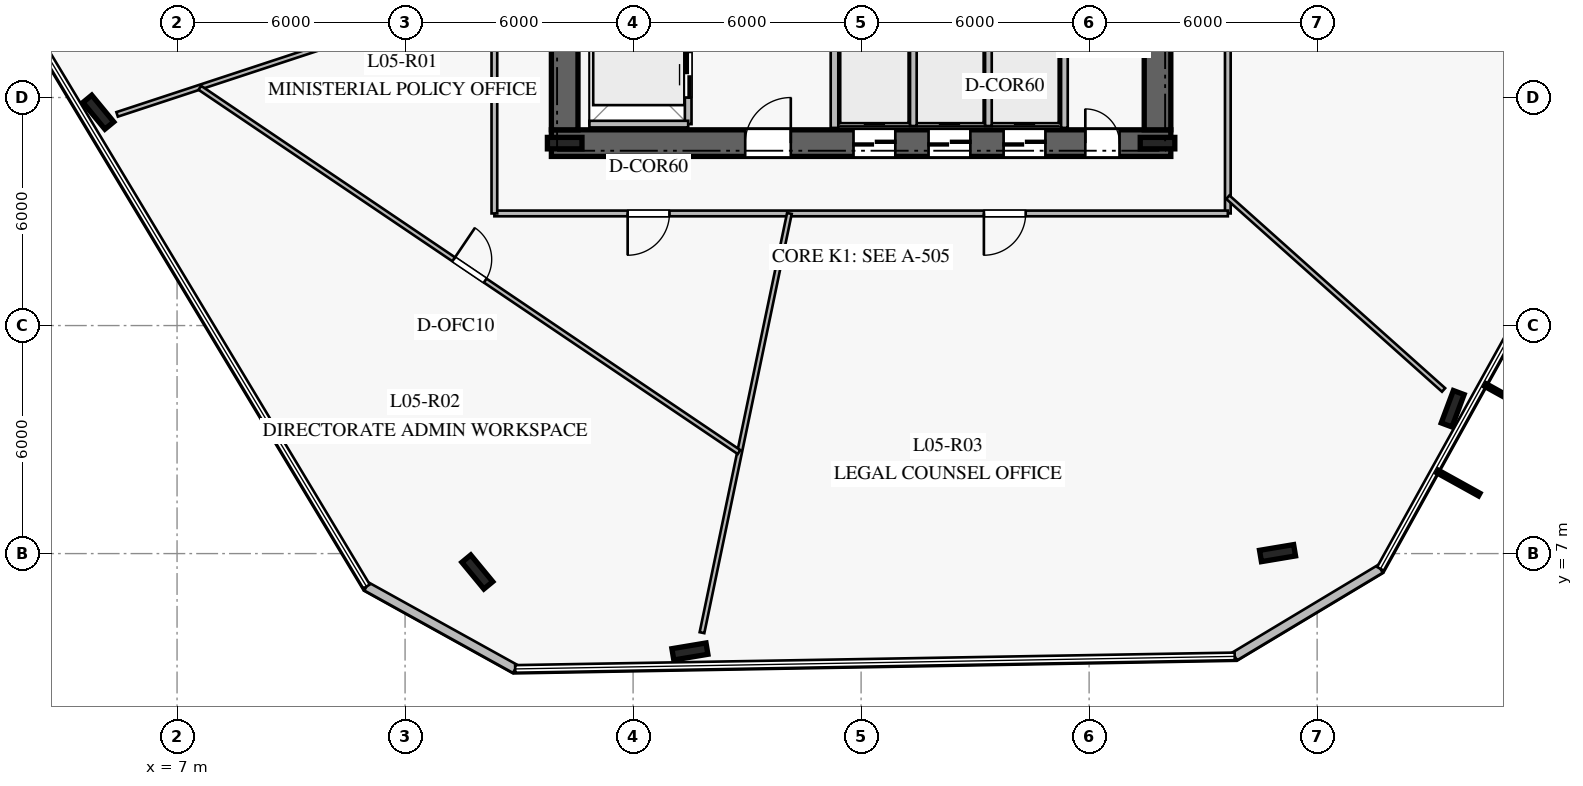
"""IFC4 building model, lengths in metres.
Left out: names, types, materials, properties, quantities, classifications, styles, units other than length and angle.
Written with IfcOpenShell. Run it as: python <this file> out.ifc"""

import sys

from ifc_helpers import new_model, si_unit, direction, frame, frame_2d, origin, origin_2d, place, context, subcontext, project, spatial, rectangle, i_section, extrude, element, fill, save


model = new_model("IFC4")
c1 = context("Model", 3, precision=1e-05, world=origin(), true_north=direction((0.0, 1.0)))
c2 = subcontext(c1, "Body", "Model", "MODEL_VIEW")
j1 = project(units=[si_unit("LENGTHUNIT", "METRE"), si_unit("PLANEANGLEUNIT", "RADIAN")], contexts=[c1])
p1 = place(None, origin())
s1 = spatial("IfcSite", under=j1, at=p1, CompositionType="ELEMENT")
p2 = place(p1, origin())
s2 = spatial("IfcBuilding", under=s1, at=p2, CompositionType="ELEMENT")
p3 = place(p2, frame((0.0, 0.0, 24.0)))
s3 = spatial("IfcBuildingStorey", under=s2, at=p3, CompositionType="ELEMENT", Elevation=24.0)
p4 = place(p3, frame((16.85, 17.8, 0.0), z_axis=(0.0, 0.0, 1.0), x_axis=(1.0, 0.0, 0.0)))
e1 = element("IfcWall", 1, at=p4, inside=s3, PredefinedType="SHEAR", context=c2, shape_type="SweptSolid", body=[
    extrude(rectangle(XDim=16.3, YDim=0.7, at=frame_2d((8.15, 0.0))), origin(), (0.0, 0.0, 1.0), 3.76),
])
p5 = place(p4, frame((5.1, 0.0, 0.0)))
e2 = element("IfcOpeningElement", 2, at=p5, cuts=e1, PredefinedType="OPENING", context=c2, shape_type="SweptSolid", body=[
    extrude(rectangle(XDim=1.2, YDim=2.25, at=frame_2d((0.6, 1.125))), frame((0.0, 0.36, 0.0), z_axis=(0.0, -1.0, 0.0), x_axis=(1.0, 0.0, 0.0)), (0.0, 0.0, 1.0), 0.72),
])
p6 = place(p4, frame((14.05, 0.0, 0.0)))
e3 = element("IfcOpeningElement", 3, at=p6, cuts=e1, PredefinedType="OPENING", context=c2, shape_type="SweptSolid", body=[
    extrude(rectangle(XDim=0.9, YDim=2.1, at=frame_2d((0.45, 1.05))), frame((0.0, 0.36, 0.0), z_axis=(0.0, -1.0, 0.0), x_axis=(1.0, 0.0, 0.0)), (0.0, 0.0, 1.0), 0.72),
])
p7 = place(p4, frame((7.95, 0.0, 0.0)))
e4 = element("IfcOpeningElement", 4, at=p7, cuts=e1, PredefinedType="OPENING", context=c2, shape_type="SweptSolid", body=[
    extrude(rectangle(XDim=1.1, YDim=2.2, at=frame_2d((0.55, 1.1))), frame((0.0, 0.36, 0.0), z_axis=(0.0, -1.0, 0.0), x_axis=(1.0, 0.0, 0.0)), (0.0, 0.0, 1.0), 0.72),
])
p8 = place(p4, frame((9.925, 0.0, 0.0)))
e5 = element("IfcOpeningElement", 5, at=p8, cuts=e1, PredefinedType="OPENING", context=c2, shape_type="SweptSolid", body=[
    extrude(rectangle(XDim=1.1, YDim=2.2, at=frame_2d((0.55, 1.1))), frame((0.0, 0.36, 0.0), z_axis=(0.0, -1.0, 0.0), x_axis=(1.0, 0.0, 0.0)), (0.0, 0.0, 1.0), 0.72),
])
p9 = place(p4, frame((11.9, 0.0, 0.0)))
e6 = element("IfcOpeningElement", 6, at=p9, cuts=e1, PredefinedType="OPENING", context=c2, shape_type="SweptSolid", body=[
    extrude(rectangle(XDim=1.1, YDim=2.2, at=frame_2d((0.55, 1.1))), frame((0.0, 0.36, 0.0), z_axis=(0.0, -1.0, 0.0), x_axis=(1.0, 0.0, 0.0)), (0.0, 0.0, 1.0), 0.72),
])
p10 = place(p3, frame((17.2, 31.85, 0.0), z_axis=(0.0, 0.0, 1.0), x_axis=(0.0, -1.0, 0.0)))
e7 = element("IfcWall", 7, at=p10, inside=s3, PredefinedType="SHEAR", context=c2, shape_type="SweptSolid", body=[
    extrude(rectangle(XDim=13.7, YDim=0.7, at=frame_2d((6.85, 0.0))), origin(), (0.0, 0.0, 1.0), 3.76),
])
p11 = place(p10, frame((2.0, 0.0, 0.0)))
e8 = element("IfcOpeningElement", 8, at=p11, cuts=e7, PredefinedType="OPENING", context=c2, shape_type="SweptSolid", body=[
    extrude(rectangle(XDim=1.5, YDim=2.2, at=frame_2d((0.75, 1.1))), frame((0.0, 0.36, 0.0), z_axis=(0.0, -1.0, 0.0), x_axis=(1.0, 0.0, 0.0)), (0.0, 0.0, 1.0), 0.72),
])
p12 = place(p3, frame((32.8, 18.15, 0.0), z_axis=(0.0, 0.0, 1.0), x_axis=(0.0, 1.0, 0.0)))
e9 = element("IfcWall", 9, at=p12, inside=s3, PredefinedType="SHEAR", context=c2, shape_type="SweptSolid", body=[
    extrude(rectangle(XDim=13.7, YDim=0.7, at=frame_2d((6.85, 0.0))), origin(), (0.0, 0.0, 1.0), 3.76),
])
for number, where, z_axis, x_axis in (
    (10, (17.2, 17.8, 0.0), (0.0, 0.0, 1.0), (1.0, 0.0, 0.0)),
    (11, (32.8, 17.8, 0.0), (0.0, 0.0, 1.0), (1.0, 0.0, 0.0)),
):
    element("IfcColumn", number, at=place(p3, frame(where, z_axis=z_axis, x_axis=x_axis)), inside=s3, PredefinedType="COLUMN", context=c2, shape_type="SweptSolid", body=[
        extrude(i_section(OverallWidth=0.302, OverallDepth=0.91, WebThickness=0.021, FlangeThickness=0.04, at=origin_2d()), origin(), (0.0, 0.0, 1.0), 4.0),
    ])
for number, where, z_axis, x_axis in (
    (12, (4.928, 18.614, -0.24), (0.0, 0.0, 1.0), (-0.636, 0.772, 0.0)),
    (13, (14.901, 6.516, -0.24), (0.0, 0.0, 1.0), (-0.636, 0.772, 0.0)),
    (14, (20.495, 4.424, -0.24), (0.0, 0.0, 1.0), (0.986, 0.165, 0.0)),
    (15, (35.958, 7.012, -0.24), (0.0, 0.0, 1.0), (0.986, 0.165, 0.0)),
    (16, (40.567, 10.811, -0.24), (0.0, 0.0, 1.0), (0.35, 0.937, 0.0)),
):
    element("IfcColumn", number, at=place(p3, frame(where, z_axis=z_axis, x_axis=x_axis)), inside=s3, PredefinedType="COLUMN", context=c2, shape_type="SweptSolid", body=[
        extrude(i_section(OverallWidth=0.302, OverallDepth=0.91, WebThickness=0.021, FlangeThickness=0.04, at=origin_2d()), origin(), (0.0, 0.0, 1.0), 4.24),
    ])
for number, where, z_axis, x_axis in (
    (17, (11.985, 6.134, 0.0), (0.0, 0.0, 1.0), (0.875, -0.485, 0.0)),
    (18, (34.831, 4.295, 0.0), (0.0, 0.0, 1.0), (0.857, 0.515, 0.0)),
):
    element("IfcWall", number, at=place(p3, frame(where, z_axis=z_axis, x_axis=x_axis)), inside=s3, PredefinedType="STANDARD", context=c2, shape_type="SweptSolid", body=[
        extrude(rectangle(XDim=4.474, YDim=0.24, at=frame_2d((2.237, 0.0))), origin(), (0.0, 0.0, 1.0), 3.76),
    ])
p13 = place(p3, frame((24.3, 18.2, 0.0), z_axis=(0.0, 0.0, 1.0), x_axis=(0.0, 1.0, 0.0)))
e19 = element("IfcWall", 19, at=p13, inside=s3, PredefinedType="PARTITIONING", context=c2, shape_type="SweptSolid", body=[
    extrude(rectangle(XDim=5.15, YDim=0.2, at=frame_2d((2.575, 0.0))), origin(), (0.0, 0.0, 1.0), 3.76),
])
p14 = place(p3, frame((30.35, 18.2, 0.0), z_axis=(0.0, 0.0, 1.0), x_axis=(0.0, 1.0, 0.0)))
e20 = element("IfcWall", 20, at=p14, inside=s3, PredefinedType="PARTITIONING", context=c2, shape_type="SweptSolid", body=[
    extrude(rectangle(XDim=3.48, YDim=0.175, at=frame_2d((1.74, 0.0))), origin(), (0.0, 0.0, 1.0), 3.76),
])
for number, where, z_axis, x_axis in (
    (21, (26.375, 18.25, 0.0), (0.0, 0.0, 1.0), (0.0, 1.0, 0.0)),
    (22, (28.35, 18.25, 0.0), (0.0, 0.0, 1.0), (0.0, 1.0, 0.0)),
):
    element("IfcWall", number, at=place(p3, frame(where, z_axis=z_axis, x_axis=x_axis)), inside=s3, PredefinedType="PARTITIONING", context=c2, shape_type="SweptSolid", body=[
        extrude(rectangle(XDim=2.35, YDim=0.175, at=frame_2d((1.175, 0.0))), origin(), (0.0, 0.0, 1.0), 3.76),
    ])
p15 = place(p3, frame((20.45, 18.3, 0.0), z_axis=(0.0, 0.0, 1.0), x_axis=(0.0, 1.0, 0.0)))
e23 = element("IfcWall", 23, at=p15, inside=s3, PredefinedType="PARTITIONING", context=c2, shape_type="SweptSolid", body=[
    extrude(rectangle(XDim=2.6, YDim=0.175, at=frame_2d((1.3, 0.0))), origin(), (0.0, 0.0, 1.0), 3.76),
])
p16 = place(p15, frame((0.7, 0.0, 0.0)))
e24 = element("IfcOpeningElement", 24, at=p16, cuts=e23, PredefinedType="OPENING", context=c2, shape_type="SweptSolid", body=[
    extrude(rectangle(XDim=1.2, YDim=2.2, at=frame_2d((0.6, 1.1))), frame((0.0, 0.098, 0.0), z_axis=(0.0, -1.0, 0.0), x_axis=(1.0, 0.0, 0.0)), (0.0, 0.0, 1.0), 0.195),
])
p17 = place(p3, frame((17.85, 18.3, 0.0), z_axis=(0.0, 0.0, 1.0), x_axis=(1.0, 0.0, 0.0)))
e25 = element("IfcWall", 25, at=p17, inside=s3, PredefinedType="PARTITIONING", context=c2, shape_type="SweptSolid", body=[
    extrude(rectangle(XDim=2.6, YDim=0.175, at=frame_2d((1.3, 0.0))), origin(), (0.0, 0.0, 1.0), 3.76),
])
p18 = place(p3, frame((34.65, 34.05, 0.0), z_axis=(0.0, 0.0, 1.0), x_axis=(0.0, -1.0, 0.0)))
e26 = element("IfcWall", 26, at=p18, inside=s3, PredefinedType="PARTITIONING", context=c2, shape_type="SweptSolid", body=[
    extrude(rectangle(XDim=18.1, YDim=0.15, at=frame_2d((9.05, 0.0))), origin(), (0.0, 0.0, 1.0), 3.21),
])
p19 = place(p18, frame((12.19, 0.0, 0.0)))
e27 = element("IfcOpeningElement", 27, at=p19, cuts=e26, PredefinedType="OPENING", context=c2, shape_type="SweptSolid", body=[
    extrude(rectangle(XDim=1.1, YDim=2.2, at=frame_2d((0.55, 1.1))), frame((0.0, 0.085, 0.0), z_axis=(0.0, -1.0, 0.0), x_axis=(1.0, 0.0, 0.0)), (0.0, 0.0, 1.0), 0.17),
])
p20 = place(p18, frame((4.929, 0.0, 0.0)))
e28 = element("IfcOpeningElement", 28, at=p20, cuts=e26, PredefinedType="OPENING", context=c2, shape_type="SweptSolid", body=[
    extrude(rectangle(XDim=1.1, YDim=2.2, at=frame_2d((0.55, 1.1))), frame((0.0, 0.085, 0.0), z_axis=(0.0, -1.0, 0.0), x_axis=(1.0, 0.0, 0.0)), (0.0, 0.0, 1.0), 0.17),
])
p21 = place(p3, frame((34.65, 15.95, 0.0), z_axis=(0.0, 0.0, 1.0), x_axis=(-1.0, 0.0, 0.0)))
e29 = element("IfcWall", 29, at=p21, inside=s3, PredefinedType="PARTITIONING", context=c2, shape_type="SweptSolid", body=[
    extrude(rectangle(XDim=19.3, YDim=0.15, at=frame_2d((9.65, 0.0))), origin(), (0.0, 0.0, 1.0), 3.21),
])
p22 = place(p21, frame((14.693, 0.0, 0.0)))
e30 = element("IfcOpeningElement", 30, at=p22, cuts=e29, PredefinedType="OPENING", context=c2, shape_type="SweptSolid", body=[
    extrude(rectangle(XDim=1.1, YDim=2.2, at=frame_2d((0.55, 1.1))), frame((0.0, 0.085, 0.0), z_axis=(0.0, -1.0, 0.0), x_axis=(1.0, 0.0, 0.0)), (0.0, 0.0, 1.0), 0.17),
])
p23 = place(p21, frame((5.319, 0.0, 0.0)))
e31 = element("IfcOpeningElement", 31, at=p23, cuts=e29, PredefinedType="OPENING", context=c2, shape_type="SweptSolid", body=[
    extrude(rectangle(XDim=1.1, YDim=2.2, at=frame_2d((0.55, 1.1))), frame((0.0, 0.085, 0.0), z_axis=(0.0, -1.0, 0.0), x_axis=(1.0, 0.0, 0.0)), (0.0, 0.0, 1.0), 0.17),
])
p24 = place(p3, frame((15.35, 15.95, 0.0), z_axis=(0.0, 0.0, 1.0), x_axis=(0.0, 1.0, 0.0)))
e32 = element("IfcWall", 32, at=p24, inside=s3, PredefinedType="PARTITIONING", context=c2, shape_type="SweptSolid", body=[
    extrude(rectangle(XDim=18.1, YDim=0.15, at=frame_2d((9.05, 0.0))), origin(), (0.0, 0.0, 1.0), 3.21),
])
p25 = place(p24, frame((11.332, 0.0, 0.0)))
e33 = element("IfcOpeningElement", 33, at=p25, cuts=e32, PredefinedType="OPENING", context=c2, shape_type="SweptSolid", body=[
    extrude(rectangle(XDim=1.1, YDim=2.2, at=frame_2d((0.55, 1.1))), frame((0.0, 0.085, 0.0), z_axis=(0.0, -1.0, 0.0), x_axis=(1.0, 0.0, 0.0)), (0.0, 0.0, 1.0), 0.17),
])
p26 = place(p3, frame((15.35, 21.824, 0.0), z_axis=(0.0, 0.0, 1.0), x_axis=(-0.949851770283, -0.312700518851, 0.0)))
e34 = element("IfcWall", 34, at=p26, inside=s3, PredefinedType="PARTITIONING", context=c2, shape_type="SweptSolid", body=[
    extrude(rectangle(XDim=10.451, YDim=0.125, at=frame_2d((5.226, 0.0))), origin(), (0.0, 0.0, 1.0), 3.21),
])
p27 = place(p3, frame((23.113, 15.95, 0.0), z_axis=(0.0, 0.0, 1.0), x_axis=(-0.204117775604, -0.97894633851, 0.0)))
e35 = element("IfcWall", 35, at=p27, inside=s3, PredefinedType="PARTITIONING", context=c2, shape_type="SweptSolid", body=[
    extrude(rectangle(XDim=11.268, YDim=0.125, at=frame_2d((5.634, 0.0))), origin(), (0.0, 0.0, 1.0), 3.76),
])
p28 = place(p3, frame((34.65, 16.378, 0.0), z_axis=(0.0, 0.0, 1.0), x_axis=(0.745724240471, -0.666254723941, 0.0)))
e36 = element("IfcWall", 36, at=p28, inside=s3, PredefinedType="PARTITIONING", context=c2, shape_type="SweptSolid", body=[
    extrude(rectangle(XDim=7.613, YDim=0.125, at=frame_2d((3.806, 0.0))), origin(), (0.0, 0.0, 1.0), 3.05),
])
p29 = place(p3, frame((7.599, 19.256, 0.0), z_axis=(0.0, 0.0, 1.0), x_axis=(0.828641341799, -0.559779891262, 0.0)))
e37 = element("IfcWall", 37, at=p29, inside=s3, PredefinedType="PARTITIONING", context=c2, shape_type="SweptSolid", body=[
    extrude(rectangle(XDim=17.123, YDim=0.125, at=frame_2d((8.562, 0.0))), origin(), (0.0, 0.0, 1.0), 3.21),
])
p30 = place(p29, frame((8.062, 0.0, 0.0)))
e38 = element("IfcOpeningElement", 38, at=p30, cuts=e37, PredefinedType="OPENING", context=c2, shape_type="SweptSolid", body=[
    extrude(rectangle(XDim=1.0, YDim=2.15, at=frame_2d((0.5, 1.075))), frame((0.0, 0.073, 0.0), z_axis=(0.0, -1.0, 0.0), x_axis=(1.0, 0.0, 0.0)), (0.0, 0.0, 1.0), 0.145),
])
p31 = place(p5, origin())
e39 = element("IfcDoor", 39, at=p31, inside=s3, OperationType="SINGLE_SWING_RIGHT", PredefinedType="DOOR", context=c2, shape_type="SweptSolid", body=[
    extrude(rectangle(XDim=1.2, YDim=2.25, at=frame_2d((0.6, 1.125))), frame((0.0, 0.025, 0.0), z_axis=(0.0, -1.0, 0.0), x_axis=(1.0, 0.0, 0.0)), (0.0, 0.0, 1.0), 0.05),
])
fill(e2, e39)
p32 = place(p6, origin())
e40 = element("IfcDoor", 40, at=p32, inside=s3, OperationType="SINGLE_SWING_LEFT", PredefinedType="DOOR", context=c2, shape_type="SweptSolid", body=[
    extrude(rectangle(XDim=0.9, YDim=2.1, at=frame_2d((0.45, 1.05))), frame((0.0, 0.025, 0.0), z_axis=(0.0, -1.0, 0.0), x_axis=(1.0, 0.0, 0.0)), (0.0, 0.0, 1.0), 0.05),
])
fill(e3, e40)
p33 = place(p7, origin())
e41 = element("IfcDoor", 41, at=p33, inside=s3, OperationType="DOUBLE_DOOR_SLIDING", PredefinedType="DOOR", context=c2, shape_type="SweptSolid", body=[
    extrude(rectangle(XDim=1.1, YDim=2.2, at=frame_2d((0.55, 1.1))), frame((0.0, 0.025, 0.0), z_axis=(0.0, -1.0, 0.0), x_axis=(1.0, 0.0, 0.0)), (0.0, 0.0, 1.0), 0.05),
])
fill(e4, e41)
p34 = place(p8, origin())
e42 = element("IfcDoor", 42, at=p34, inside=s3, OperationType="DOUBLE_DOOR_SLIDING", PredefinedType="DOOR", context=c2, shape_type="SweptSolid", body=[
    extrude(rectangle(XDim=1.1, YDim=2.2, at=frame_2d((0.55, 1.1))), frame((0.0, 0.025, 0.0), z_axis=(0.0, -1.0, 0.0), x_axis=(1.0, 0.0, 0.0)), (0.0, 0.0, 1.0), 0.05),
])
fill(e5, e42)
p35 = place(p9, origin())
e43 = element("IfcDoor", 43, at=p35, inside=s3, OperationType="DOUBLE_DOOR_SLIDING", PredefinedType="DOOR", context=c2, shape_type="SweptSolid", body=[
    extrude(rectangle(XDim=1.1, YDim=2.2, at=frame_2d((0.55, 1.1))), frame((0.0, 0.025, 0.0), z_axis=(0.0, -1.0, 0.0), x_axis=(1.0, 0.0, 0.0)), (0.0, 0.0, 1.0), 0.05),
])
fill(e6, e43)
p36 = place(p16, origin())
e44 = element("IfcDoor", 44, at=p36, inside=s3, OperationType="DOUBLE_DOOR_SLIDING", PredefinedType="DOOR", context=c2, shape_type="SweptSolid", body=[
    extrude(rectangle(XDim=1.2, YDim=2.2, at=frame_2d((0.6, 1.1))), frame((0.0, 0.025, 0.0), z_axis=(0.0, -1.0, 0.0), x_axis=(1.0, 0.0, 0.0)), (0.0, 0.0, 1.0), 0.05),
])
fill(e24, e44)
p37 = place(p22, origin())
e45 = element("IfcDoor", 45, at=p37, inside=s3, OperationType="SINGLE_SWING_RIGHT", PredefinedType="DOOR", context=c2, shape_type="SweptSolid", body=[
    extrude(rectangle(XDim=1.1, YDim=2.2, at=frame_2d((0.55, 1.1))), frame((0.0, 0.025, 0.0), z_axis=(0.0, -1.0, 0.0), x_axis=(1.0, 0.0, 0.0)), (0.0, 0.0, 1.0), 0.05),
])
fill(e30, e45)
p38 = place(p30, origin())
e46 = element("IfcDoor", 46, at=p38, inside=s3, OperationType="SINGLE_SWING_LEFT", PredefinedType="DOOR", context=c2, shape_type="SweptSolid", body=[
    extrude(rectangle(XDim=1.0, YDim=2.15, at=frame_2d((0.5, 1.075))), frame((0.0, 0.025, 0.0), z_axis=(0.0, -1.0, 0.0), x_axis=(1.0, 0.0, 0.0)), (0.0, 0.0, 1.0), 0.05),
])
fill(e38, e46)
p39 = place(p23, origin())
e47 = element("IfcDoor", 47, at=p39, inside=s3, OperationType="SINGLE_SWING_RIGHT", PredefinedType="DOOR", context=c2, shape_type="SweptSolid", body=[
    extrude(rectangle(XDim=1.1, YDim=2.2, at=frame_2d((0.55, 1.1))), frame((0.0, 0.025, 0.0), z_axis=(0.0, -1.0, 0.0), x_axis=(1.0, 0.0, 0.0)), (0.0, 0.0, 1.0), 0.05),
])
fill(e31, e47)
save(model, sys.argv[1])
